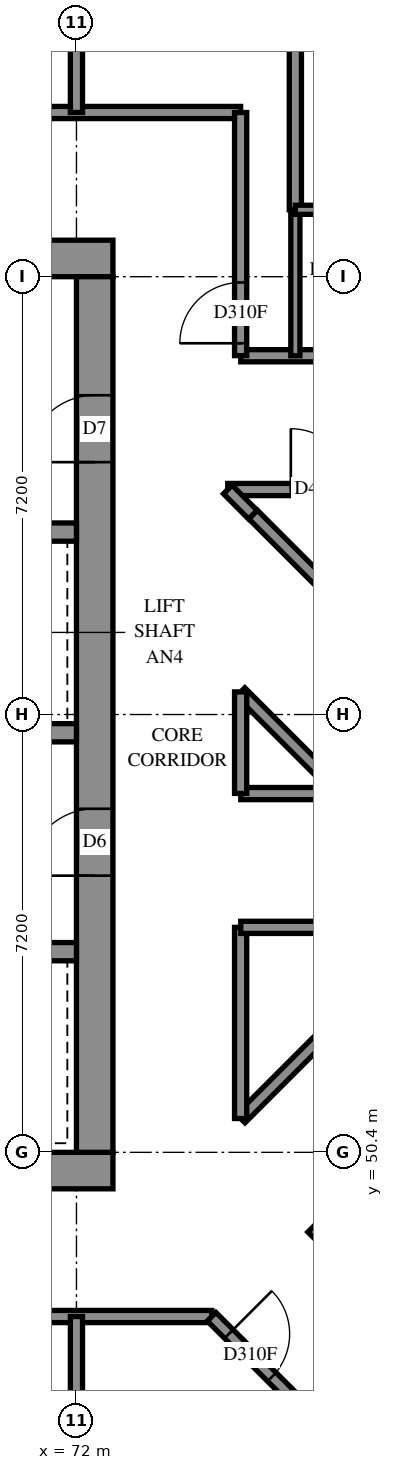
"""IFC4 building model, lengths in metres.
Left out: names, types, materials, properties, quantities, classifications, styles, units other than length and angle.
Written with IfcOpenShell. Run it as: python <this file> out.ifc"""

import sys

from ifc_helpers import new_model, si_unit, direction, frame, frame_2d, origin, place, context, subcontext, project, spatial, rectangle, extrude, element, fill, save


model = new_model("IFC4")
c1 = context("Model", 3, precision=1e-05, world=origin(), true_north=direction((0.0, 1.0)))
c2 = subcontext(c1, "Body", "Model", "MODEL_VIEW")
j1 = project(units=[si_unit("LENGTHUNIT", "METRE"), si_unit("PLANEANGLEUNIT", "RADIAN")], contexts=[c1])
p1 = place(None, origin())
s1 = spatial("IfcSite", under=j1, at=p1, CompositionType="ELEMENT")
p2 = place(p1, origin())
s2 = spatial("IfcBuilding", under=s1, at=p2, CompositionType="ELEMENT")
p3 = place(p2, frame((0.0, 0.0, 162.6)))
s3 = spatial("IfcBuildingStorey", under=s2, at=p3, CompositionType="ELEMENT", Elevation=162.6)
p4 = place(p3, frame((57.0, 50.1, -0.3), z_axis=(0.0, 0.0, 1.0), x_axis=(1.0, 0.0, 0.0)))
e1 = element("IfcWall", 1, at=p4, inside=s3, PredefinedType="SHEAR", context=c2, shape_type="SweptSolid", body=[
    extrude(rectangle(XDim=15.6, YDim=0.6, at=frame_2d((7.8, 0.0))), origin(), (0.0, 0.0, 1.0), 2.7),
])
p5 = place(p3, frame((57.0, 65.1, -0.3), z_axis=(0.0, 0.0, 1.0), x_axis=(1.0, 0.0, 0.0)))
e2 = element("IfcWall", 2, at=p5, inside=s3, PredefinedType="SHEAR", context=c2, shape_type="SweptSolid", body=[
    extrude(rectangle(XDim=15.6, YDim=0.6, at=frame_2d((7.8, 0.0))), origin(), (0.0, 0.0, 1.0), 2.7),
])
p6 = place(p5, frame((10.6, 0.0, 0.3)))
e3 = element("IfcOpeningElement", 3, at=p6, cuts=e2, PredefinedType="OPENING", context=c2, shape_type="SweptSolid", body=[
    extrude(rectangle(XDim=0.8, YDim=2.1, at=frame_2d((0.4, 1.05))), frame((0.0, 0.31, 0.0), z_axis=(0.0, -1.0, 0.0), x_axis=(1.0, 0.0, 0.0)), (0.0, 0.0, 1.0), 0.62),
])
p7 = place(p3, frame((72.3, 50.4, -0.3), z_axis=(0.0, 0.0, 1.0), x_axis=(0.0, 1.0, 0.0)))
e4 = element("IfcWall", 4, at=p7, inside=s3, PredefinedType="SHEAR", context=c2, shape_type="SweptSolid", body=[
    extrude(rectangle(XDim=14.4, YDim=0.6, at=frame_2d((7.2, 0.0))), origin(), (0.0, 0.0, 1.0), 2.7),
])
p8 = place(p7, frame((4.55, 0.0, 0.3)))
e5 = element("IfcOpeningElement", 5, at=p8, cuts=e4, PredefinedType="OPENING", context=c2, shape_type="SweptSolid", body=[
    extrude(rectangle(XDim=1.1, YDim=2.1, at=frame_2d((0.55, 1.05))), frame((0.0, 0.31, 0.0), z_axis=(0.0, -1.0, 0.0), x_axis=(1.0, 0.0, 0.0)), (0.0, 0.0, 1.0), 0.62),
])
p9 = place(p7, frame((11.35, 0.0, 0.3)))
e6 = element("IfcOpeningElement", 6, at=p9, cuts=e4, PredefinedType="OPENING", context=c2, shape_type="SweptSolid", body=[
    extrude(rectangle(XDim=1.1, YDim=2.1, at=frame_2d((0.55, 1.05))), frame((0.0, 0.31, 0.0), z_axis=(0.0, -1.0, 0.0), x_axis=(1.0, 0.0, 0.0)), (0.0, 0.0, 1.0), 0.62),
])
p10 = place(p3, frame((57.6, 53.7, 0.0), z_axis=(0.0, 0.0, 1.0), x_axis=(1.0, 0.0, 0.0)))
e7 = element("IfcWall", 7, at=p10, inside=s3, PredefinedType="SOLIDWALL", context=c2, shape_type="SweptSolid", body=[
    extrude(rectangle(XDim=14.4, YDim=0.3, at=frame_2d((7.2, 0.0))), origin(), (0.0, 0.0, 1.0), 3.1),
])
p11 = place(p10, frame((1.35, 0.0, 0.0)))
e8 = element("IfcOpeningElement", 8, at=p11, cuts=e7, PredefinedType="OPENING", context=c2, shape_type="SweptSolid", body=[
    extrude(rectangle(XDim=0.9, YDim=2.1, at=frame_2d((0.45, 1.05))), frame((0.0, 0.16, 0.0), z_axis=(0.0, -1.0, 0.0), x_axis=(1.0, 0.0, 0.0)), (0.0, 0.0, 1.0), 0.32),
])
p12 = place(p10, frame((4.95, 0.0, 0.0)))
e9 = element("IfcOpeningElement", 9, at=p12, cuts=e7, PredefinedType="OPENING", context=c2, shape_type="SweptSolid", body=[
    extrude(rectangle(XDim=0.9, YDim=2.1, at=frame_2d((0.45, 1.05))), frame((0.0, 0.16, 0.0), z_axis=(0.0, -1.0, 0.0), x_axis=(1.0, 0.0, 0.0)), (0.0, 0.0, 1.0), 0.32),
])
p13 = place(p10, frame((8.55, 0.0, 0.0)))
e10 = element("IfcOpeningElement", 10, at=p13, cuts=e7, PredefinedType="OPENING", context=c2, shape_type="SweptSolid", body=[
    extrude(rectangle(XDim=0.9, YDim=2.1, at=frame_2d((0.45, 1.05))), frame((0.0, 0.16, 0.0), z_axis=(0.0, -1.0, 0.0), x_axis=(1.0, 0.0, 0.0)), (0.0, 0.0, 1.0), 0.32),
])
p14 = place(p10, frame((12.05, 0.0, 0.0)))
e11 = element("IfcOpeningElement", 11, at=p14, cuts=e7, PredefinedType="OPENING", context=c2, shape_type="SweptSolid", body=[
    extrude(rectangle(XDim=1.1, YDim=2.1, at=frame_2d((0.55, 1.05))), frame((0.0, 0.16, 0.0), z_axis=(0.0, -1.0, 0.0), x_axis=(1.0, 0.0, 0.0)), (0.0, 0.0, 1.0), 0.32),
])
p15 = place(p3, frame((57.6, 57.3, 0.0), z_axis=(0.0, 0.0, 1.0), x_axis=(1.0, 0.0, 0.0)))
e12 = element("IfcWall", 12, at=p15, inside=s3, PredefinedType="SOLIDWALL", context=c2, shape_type="SweptSolid", body=[
    extrude(rectangle(XDim=14.4, YDim=0.3, at=frame_2d((7.2, 0.0))), origin(), (0.0, 0.0, 1.0), 3.1),
])
p16 = place(p15, frame((1.25, 0.0, 0.0)))
e13 = element("IfcOpeningElement", 13, at=p16, cuts=e12, PredefinedType="OPENING", context=c2, shape_type="SweptSolid", body=[
    extrude(rectangle(XDim=1.1, YDim=2.1, at=frame_2d((0.55, 1.05))), frame((0.0, 0.16, 0.0), z_axis=(0.0, -1.0, 0.0), x_axis=(1.0, 0.0, 0.0)), (0.0, 0.0, 1.0), 0.32),
])
p17 = place(p15, frame((4.85, 0.0, 0.0)))
e14 = element("IfcOpeningElement", 14, at=p17, cuts=e12, PredefinedType="OPENING", context=c2, shape_type="SweptSolid", body=[
    extrude(rectangle(XDim=1.1, YDim=2.1, at=frame_2d((0.55, 1.05))), frame((0.0, 0.16, 0.0), z_axis=(0.0, -1.0, 0.0), x_axis=(1.0, 0.0, 0.0)), (0.0, 0.0, 1.0), 0.32),
])
p18 = place(p15, frame((8.45, 0.0, 0.0)))
e15 = element("IfcOpeningElement", 15, at=p18, cuts=e12, PredefinedType="OPENING", context=c2, shape_type="SweptSolid", body=[
    extrude(rectangle(XDim=1.1, YDim=2.1, at=frame_2d((0.55, 1.05))), frame((0.0, 0.16, 0.0), z_axis=(0.0, -1.0, 0.0), x_axis=(1.0, 0.0, 0.0)), (0.0, 0.0, 1.0), 0.32),
])
p19 = place(p15, frame((12.05, 0.0, 0.0)))
e16 = element("IfcOpeningElement", 16, at=p19, cuts=e12, PredefinedType="OPENING", context=c2, shape_type="SweptSolid", body=[
    extrude(rectangle(XDim=1.1, YDim=2.1, at=frame_2d((0.55, 1.05))), frame((0.0, 0.16, 0.0), z_axis=(0.0, -1.0, 0.0), x_axis=(1.0, 0.0, 0.0)), (0.0, 0.0, 1.0), 0.32),
])
p20 = place(p3, frame((64.8, 60.6, 0.0), z_axis=(0.0, 0.0, 1.0), x_axis=(1.0, 0.0, 0.0)))
e17 = element("IfcWall", 17, at=p20, inside=s3, PredefinedType="SOLIDWALL", context=c2, shape_type="SweptSolid", body=[
    extrude(rectangle(XDim=7.2, YDim=0.3, at=frame_2d((3.6, 0.0))), origin(), (0.0, 0.0, 1.0), 3.1),
])
p21 = place(p3, frame((76.018, 49.302, -0.3), z_axis=(0.0, 0.0, 1.0), x_axis=(0.7071067812, -0.7071067812, 0.0)))
e18 = element("IfcWall", 18, at=p21, inside=s3, PredefinedType="SHEAR", context=c2, shape_type="SweptSolid", body=[
    extrude(rectangle(XDim=15.6, YDim=0.6, at=frame_2d((7.8, 0.0))), origin(), (0.0, 0.0, 1.0), 2.7),
])
p22 = place(p3, frame((54.9, 67.5, 0.0), z_axis=(0.0, 0.0, 1.0), x_axis=(1.0, 0.0, 0.0)))
e19 = element("IfcWall", 19, at=p22, inside=s3, PredefinedType="PARTITIONING", context=c2, shape_type="SweptSolid", body=[
    extrude(rectangle(XDim=19.8, YDim=0.2, at=frame_2d((9.9, 0.0))), origin(), (0.0, 0.0, 1.0), 3.1),
])
p23 = place(p22, frame((6.599, 0.0, 0.0)))
e20 = element("IfcOpeningElement", 20, at=p23, cuts=e19, PredefinedType="OPENING", context=c2, shape_type="SweptSolid", body=[
    extrude(rectangle(XDim=0.9, YDim=2.1, at=frame_2d((0.45, 1.05))), frame((0.0, 0.11, 0.0), z_axis=(0.0, -1.0, 0.0), x_axis=(1.0, 0.0, 0.0)), (0.0, 0.0, 1.0), 0.22),
])
p24 = place(p22, frame((14.101, 0.0, 0.0)))
e21 = element("IfcOpeningElement", 21, at=p24, cuts=e19, PredefinedType="OPENING", context=c2, shape_type="SweptSolid", body=[
    extrude(rectangle(XDim=0.9, YDim=2.1, at=frame_2d((0.45, 1.05))), frame((0.0, 0.11, 0.0), z_axis=(0.0, -1.0, 0.0), x_axis=(1.0, 0.0, 0.0)), (0.0, 0.0, 1.0), 0.22),
])
p25 = place(p3, frame((54.9, 47.7, 0.0), z_axis=(0.0, 0.0, 1.0), x_axis=(1.0, 0.0, 0.0)))
e22 = element("IfcWall", 22, at=p25, inside=s3, PredefinedType="PARTITIONING", context=c2, shape_type="SweptSolid", body=[
    extrude(rectangle(XDim=19.326, YDim=0.2, at=frame_2d((9.663, 0.0))), origin(), (0.0, 0.0, 1.0), 3.1),
])
p26 = place(p25, frame((6.599, 0.0, 0.0)))
e23 = element("IfcOpeningElement", 23, at=p26, cuts=e22, PredefinedType="OPENING", context=c2, shape_type="SweptSolid", body=[
    extrude(rectangle(XDim=0.9, YDim=2.1, at=frame_2d((0.45, 1.05))), frame((0.0, 0.11, 0.0), z_axis=(0.0, -1.0, 0.0), x_axis=(1.0, 0.0, 0.0)), (0.0, 0.0, 1.0), 0.22),
])
p27 = place(p25, frame((13.799, 0.0, 0.0)))
e24 = element("IfcOpeningElement", 24, at=p27, cuts=e22, PredefinedType="OPENING", context=c2, shape_type="SweptSolid", body=[
    extrude(rectangle(XDim=0.9, YDim=2.1, at=frame_2d((0.45, 1.05))), frame((0.0, 0.11, 0.0), z_axis=(0.0, -1.0, 0.0), x_axis=(1.0, 0.0, 0.0)), (0.0, 0.0, 1.0), 0.22),
])
p28 = place(p3, frame((75.6, 65.9, 0.0), z_axis=(0.0, 0.0, 1.0), x_axis=(0.0, 1.0, 0.0)))
e25 = element("IfcWall", 25, at=p28, inside=s3, PredefinedType="PARTITIONING", context=c2, shape_type="SweptSolid", body=[
    extrude(rectangle(XDim=6.904, YDim=0.2, at=frame_2d((3.452, 0.0))), origin(), (0.0, 0.0, 1.0), 3.1),
])
p29 = place(p3, frame((74.903, 60.889, 0.0), z_axis=(0.0, 0.0, 1.0), x_axis=(0.7071067812, -0.7071067812, 0.0)))
e26 = element("IfcWall", 26, at=p29, inside=s3, PredefinedType="PARTITIONING", context=c2, shape_type="SweptSolid", body=[
    extrude(rectangle(XDim=6.081, YDim=0.2, at=frame_2d((3.041, 0.0))), origin(), (0.0, 0.0, 1.0), 3.1),
])
p30 = place(p3, frame((74.488, 61.3, 0.0), z_axis=(0.0, 0.0, 1.0), x_axis=(1.0, 0.0, 0.0)))
e27 = element("IfcWall", 27, at=p30, inside=s3, PredefinedType="PARTITIONING", context=c2, shape_type="SweptSolid", body=[
    extrude(rectangle(XDim=4.712, YDim=0.2, at=frame_2d((2.356, 0.0))), origin(), (0.0, 0.0, 1.0), 3.1),
])
p31 = place(p30, frame((1.037, 0.0, 0.0)))
e28 = element("IfcOpeningElement", 28, at=p31, cuts=e27, PredefinedType="OPENING", context=c2, shape_type="SweptSolid", body=[
    extrude(rectangle(XDim=1.0, YDim=2.1, at=frame_2d((0.5, 1.05))), frame((0.0, 0.11, 0.0), z_axis=(0.0, -1.0, 0.0), x_axis=(1.0, 0.0, 0.0)), (0.0, 0.0, 1.0), 0.22),
])
p32 = place(p3, frame((74.223, 47.697, 0.0), z_axis=(0.0, 0.0, 1.0), x_axis=(0.7071067812, -0.7071067812, 0.0)))
e29 = element("IfcWall", 29, at=p32, inside=s3, PredefinedType="PARTITIONING", context=c2, shape_type="SweptSolid", body=[
    extrude(rectangle(XDim=4.63, YDim=0.2, at=frame_2d((2.315, 0.0))), origin(), (0.0, 0.0, 1.0), 3.1),
])
p33 = place(p32, frame((0.401, 0.0, 0.0)))
e30 = element("IfcOpeningElement", 30, at=p33, cuts=e29, PredefinedType="OPENING", context=c2, shape_type="SweptSolid", body=[
    extrude(rectangle(XDim=1.0, YDim=2.1, at=frame_2d((0.5, 1.05))), frame((0.0, 0.11, 0.0), z_axis=(0.0, -1.0, 0.0), x_axis=(1.0, 0.0, 0.0)), (0.0, 0.0, 1.0), 0.22),
])
p34 = place(p3, frame((74.702, 63.5, 0.0), z_axis=(0.0, 0.0, 1.0), x_axis=(1.0, 0.0, 0.0)))
e31 = element("IfcWall", 31, at=p34, inside=s3, PredefinedType="PARTITIONING", context=c2, shape_type="SweptSolid", body=[
    extrude(rectangle(XDim=4.498, YDim=0.2, at=frame_2d((2.249, 0.0))), origin(), (0.0, 0.0, 1.0), 3.1),
])
p35 = place(p34, frame((3.046, 0.0, 0.0)))
e32 = element("IfcOpeningElement", 32, at=p35, cuts=e31, PredefinedType="OPENING", context=c2, shape_type="SweptSolid", body=[
    extrude(rectangle(XDim=0.9, YDim=2.1, at=frame_2d((0.45, 1.05))), frame((0.0, 0.11, 0.0), z_axis=(0.0, -1.0, 0.0), x_axis=(1.0, 0.0, 0.0)), (0.0, 0.0, 1.0), 0.22),
])
p36 = place(p3, frame((74.701, 50.957, 0.0), z_axis=(0.0, 0.0, 1.0), x_axis=(0.7071067812, 0.7071067812, 0.0)))
e33 = element("IfcWall", 33, at=p36, inside=s3, PredefinedType="PARTITIONING", context=c2, shape_type="SweptSolid", body=[
    extrude(rectangle(XDim=4.444, YDim=0.2, at=frame_2d((2.222, 0.0))), origin(), (0.0, 0.0, 1.0), 3.1),
])
p37 = place(p3, frame((72.0, 43.65, 0.0), z_axis=(0.0, 0.0, 1.0), x_axis=(0.0, 1.0, 0.0)))
e34 = element("IfcWall", 34, at=p37, inside=s3, PredefinedType="PARTITIONING", context=c2, shape_type="SweptSolid", body=[
    extrude(rectangle(XDim=4.05, YDim=0.2, at=frame_2d((2.025, 0.0))), origin(), (0.0, 0.0, 1.0), 3.1),
])
p38 = place(p3, frame((74.7, 63.502, 0.0), z_axis=(0.0, 0.0, 1.0), x_axis=(0.0, 1.0, 0.0)))
e35 = element("IfcWall", 35, at=p38, inside=s3, PredefinedType="PARTITIONING", context=c2, shape_type="SweptSolid", body=[
    extrude(rectangle(XDim=3.998, YDim=0.2, at=frame_2d((1.999, 0.0))), origin(), (0.0, 0.0, 1.0), 3.1),
])
p39 = place(p38, frame((0.203, 0.0, 0.0)))
e36 = element("IfcOpeningElement", 36, at=p39, cuts=e35, PredefinedType="OPENING", context=c2, shape_type="SweptSolid", body=[
    extrude(rectangle(XDim=1.0, YDim=2.1, at=frame_2d((0.5, 1.05))), frame((0.0, 0.11, 0.0), z_axis=(0.0, -1.0, 0.0), x_axis=(1.0, 0.0, 0.0)), (0.0, 0.0, 1.0), 0.22),
])
p40 = place(p3, frame((72.0, 67.5, 0.0), z_axis=(0.0, 0.0, 1.0), x_axis=(0.0, 1.0, 0.0)))
e37 = element("IfcWall", 37, at=p40, inside=s3, PredefinedType="PARTITIONING", context=c2, shape_type="SweptSolid", body=[
    extrude(rectangle(XDim=3.946, YDim=0.2, at=frame_2d((1.973, 0.0))), origin(), (0.0, 0.0, 1.0), 3.1),
])
p41 = place(p3, frame((74.7, 50.956, 0.0), z_axis=(0.0, 0.0, 1.0), x_axis=(0.0, 1.0, 0.0)))
e38 = element("IfcWall", 38, at=p41, inside=s3, PredefinedType="PARTITIONING", context=c2, shape_type="SweptSolid", body=[
    extrude(rectangle(XDim=3.144, YDim=0.2, at=frame_2d((1.572, 0.0))), origin(), (0.0, 0.0, 1.0), 3.1),
])
p42 = place(p3, frame((74.702, 54.1, 0.0), z_axis=(0.0, 0.0, 1.0), x_axis=(1.0, 0.0, 0.0)))
e39 = element("IfcWall", 39, at=p42, inside=s3, PredefinedType="PARTITIONING", context=c2, shape_type="SweptSolid", body=[
    extrude(rectangle(XDim=3.142, YDim=0.2, at=frame_2d((1.571, 0.0))), origin(), (0.0, 0.0, 1.0), 3.1),
])
p43 = place(p3, frame((75.6, 63.5, 0.0), z_axis=(0.0, 0.0, 1.0), x_axis=(0.0, 1.0, 0.0)))
e40 = element("IfcWall", 40, at=p43, inside=s3, PredefinedType="PARTITIONING", context=c2, shape_type="SweptSolid", body=[
    extrude(rectangle(XDim=2.4, YDim=0.15, at=frame_2d((1.2, 0.0))), origin(), (0.0, 0.0, 1.0), 3.1),
])
p44 = place(p3, frame((74.699, 57.969, 0.0), z_axis=(0.0, 0.0, 1.0), x_axis=(0.7071067812, -0.7071067812, 0.0)))
e41 = element("IfcWall", 41, at=p44, inside=s3, PredefinedType="PARTITIONING", context=c2, shape_type="SweptSolid", body=[
    extrude(rectangle(XDim=2.362, YDim=0.2, at=frame_2d((1.181, 0.0))), origin(), (0.0, 0.0, 1.0), 3.1),
])
p45 = place(p3, frame((75.6, 65.9, 0.0), z_axis=(0.0, 0.0, 1.0), x_axis=(1.0, 0.0, 0.0)))
e42 = element("IfcWall", 42, at=p45, inside=s3, PredefinedType="PARTITIONING", context=c2, shape_type="SweptSolid", body=[
    extrude(rectangle(XDim=1.9, YDim=0.15, at=frame_2d((0.95, 0.0))), origin(), (0.0, 0.0, 1.0), 3.1),
])
p46 = place(p45, frame((0.607, 0.0, 0.0)))
e43 = element("IfcOpeningElement", 43, at=p46, cuts=e42, PredefinedType="OPENING", context=c2, shape_type="SweptSolid", body=[
    extrude(rectangle(XDim=0.8, YDim=2.1, at=frame_2d((0.4, 1.05))), frame((0.0, 0.085, 0.0), z_axis=(0.0, -1.0, 0.0), x_axis=(1.0, 0.0, 0.0)), (0.0, 0.0, 1.0), 0.17),
])
for number, where, z_axis, x_axis in (
    (44, (74.702, 56.3, 0.0), (0.0, 0.0, 1.0), (1.0, 0.0, 0.0)),
    (45, (74.7, 56.302, 0.0), (0.0, 0.0, 1.0), (0.0, 1.0, 0.0)),
):
    element("IfcWall", number, at=place(p3, frame(where, z_axis=z_axis, x_axis=x_axis)), inside=s3, PredefinedType="PARTITIONING", context=c2, shape_type="SweptSolid", body=[
        extrude(rectangle(XDim=1.67, YDim=0.2, at=frame_2d((0.835, 0.0))), origin(), (0.0, 0.0, 1.0), 3.1),
    ])
p47 = place(p3, frame((74.489, 61.301, 0.0), z_axis=(0.0, 0.0, 1.0), x_axis=(0.7053925905, -0.7088168263, 0.0)))
e46 = element("IfcWall", 46, at=p47, inside=s3, PredefinedType="PARTITIONING", context=c2, shape_type="SweptSolid", body=[
    extrude(rectangle(XDim=0.584, YDim=0.2, at=frame_2d((0.292, 0.0))), origin(), (0.0, 0.0, 1.0), 3.1),
])
p48 = place(p8, origin())
e47 = element("IfcDoor", 47, at=p48, inside=s3, OperationType="DOUBLE_DOOR_SINGLE_SWING", PredefinedType="DOOR", context=c2, shape_type="SweptSolid", body=[
    extrude(rectangle(XDim=1.1, YDim=2.1, at=frame_2d((0.55, 1.05))), frame((0.0, 0.025, 0.0), z_axis=(0.0, -1.0, 0.0), x_axis=(1.0, 0.0, 0.0)), (0.0, 0.0, 1.0), 0.05),
])
fill(e5, e47)
p49 = place(p9, origin())
e48 = element("IfcDoor", 48, at=p49, inside=s3, OperationType="SINGLE_SWING_RIGHT", PredefinedType="DOOR", context=c2, shape_type="SweptSolid", body=[
    extrude(rectangle(XDim=1.1, YDim=2.1, at=frame_2d((0.55, 1.05))), frame((0.0, 0.025, 0.0), z_axis=(0.0, -1.0, 0.0), x_axis=(1.0, 0.0, 0.0)), (0.0, 0.0, 1.0), 0.05),
])
fill(e6, e48)
p50 = place(p39, origin())
e49 = element("IfcDoor", 49, at=p50, inside=s3, OperationType="SINGLE_SWING_RIGHT", PredefinedType="DOOR", context=c2, shape_type="SweptSolid", body=[
    extrude(rectangle(XDim=1.0, YDim=2.1, at=frame_2d((0.5, 1.05))), frame((0.0, 0.025, 0.0), z_axis=(0.0, -1.0, 0.0), x_axis=(1.0, 0.0, 0.0)), (0.0, 0.0, 1.0), 0.05),
])
fill(e36, e49)
p51 = place(p31, origin())
e50 = element("IfcDoor", 50, at=p51, inside=s3, OperationType="SINGLE_SWING_RIGHT", PredefinedType="DOOR", context=c2, shape_type="SweptSolid", body=[
    extrude(rectangle(XDim=1.0, YDim=2.1, at=frame_2d((0.5, 1.05))), frame((0.0, 0.025, 0.0), z_axis=(0.0, -1.0, 0.0), x_axis=(1.0, 0.0, 0.0)), (0.0, 0.0, 1.0), 0.05),
])
fill(e28, e50)
p52 = place(p33, origin())
e51 = element("IfcDoor", 51, at=p52, inside=s3, OperationType="SINGLE_SWING_LEFT", PredefinedType="DOOR", context=c2, shape_type="SweptSolid", body=[
    extrude(rectangle(XDim=1.0, YDim=2.1, at=frame_2d((0.5, 1.05))), frame((0.0, 0.025, 0.0), z_axis=(0.0, -1.0, 0.0), x_axis=(1.0, 0.0, 0.0)), (0.0, 0.0, 1.0), 0.05),
])
fill(e30, e51)
save(model, sys.argv[1])
